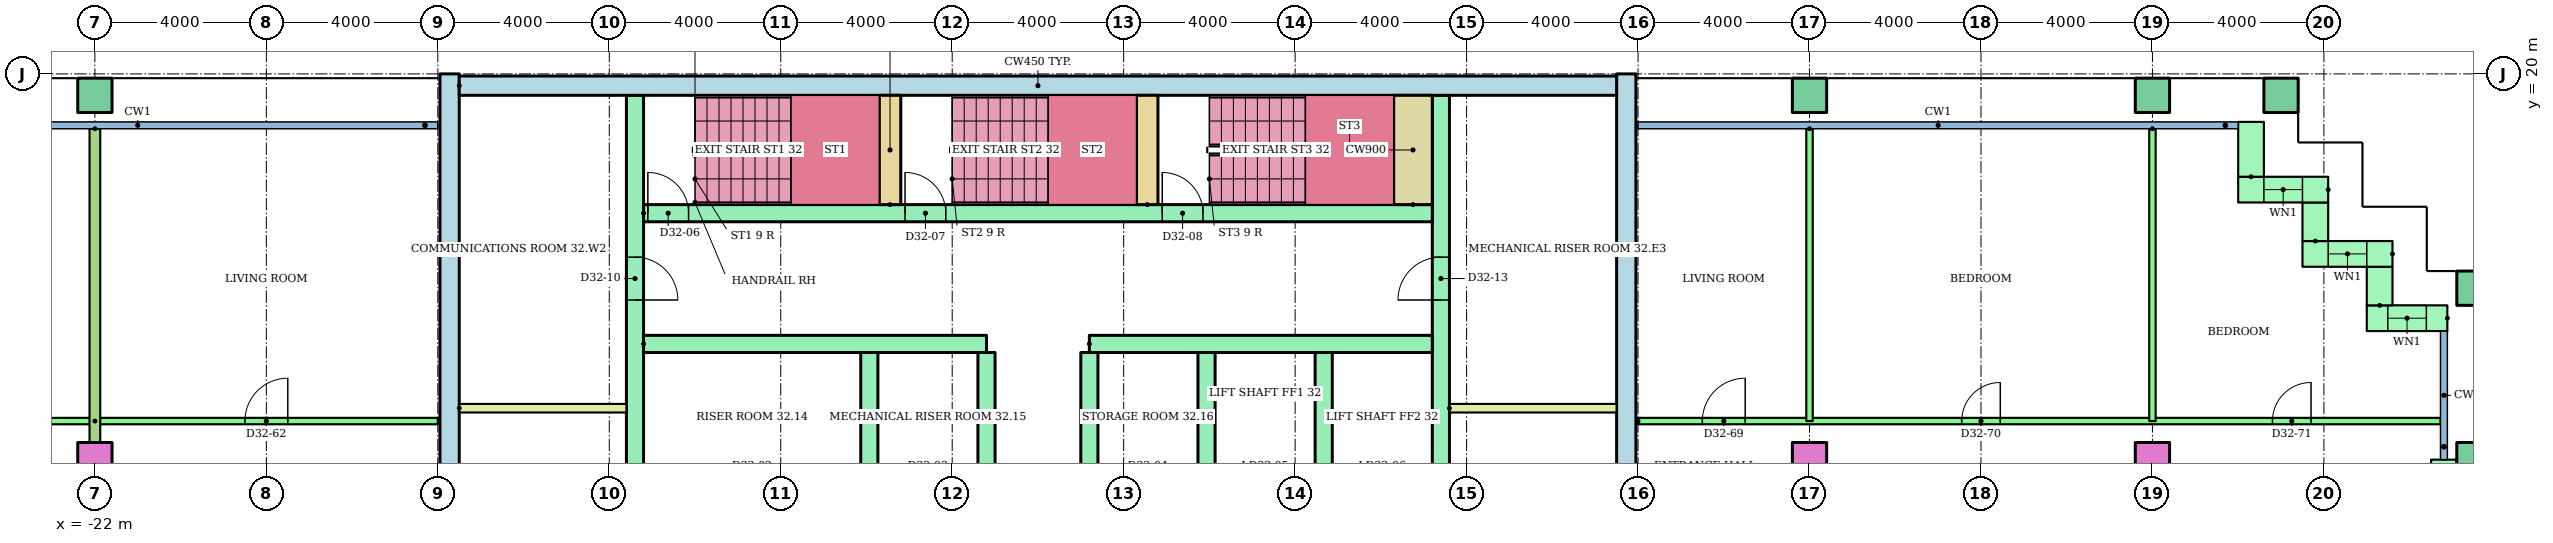
"""IFC4 building model, lengths in metres.
Left out: names, types, materials, properties, quantities, classifications, styles, units other than length and angle.
Written with IfcOpenShell. Run it as: python <this file> out.ifc"""

import sys

from ifc_helpers import new_model, si_unit, direction, frame, frame_2d, origin, origin_2d, place, context, subcontext, project, spatial, rectangle, hollow_rectangle, extrude, element, fill, save


model = new_model("IFC4")
c1 = context("Model", 3, precision=1e-05, world=origin(), true_north=direction((0.0, 1.0)))
c2 = subcontext(c1, "Body", "Model", "MODEL_VIEW")
j1 = project(units=[si_unit("LENGTHUNIT", "METRE"), si_unit("PLANEANGLEUNIT", "RADIAN")], contexts=[c1])
p1 = place(None, origin())
s1 = spatial("IfcSite", under=j1, at=p1, CompositionType="ELEMENT")
p2 = place(p1, origin())
s2 = spatial("IfcBuilding", under=s1, at=p2, CompositionType="ELEMENT")
p3 = place(p2, frame((0.0, 0.0, 126.2)))
s3 = spatial("IfcBuildingStorey", under=s2, at=p3, CompositionType="ELEMENT", Elevation=126.2)
for number, where in (
    (1, (-22.0, 11.0, 0.0)),
    (2, (18.0, 11.0, 0.0)),
    (3, (26.0, 11.0, 0.0)),
):
    element("IfcColumn", number, at=place(p3, frame(where)), inside=s3, PredefinedType="COLUMN", context=c2, shape_type="SweptSolid", body=[
        extrude(rectangle(XDim=0.8, YDim=0.8, at=origin_2d()), origin(), (0.0, 0.0, 1.0), 3.2),
    ])
for number, where in (
    (4, (33.5, 11.0, 0.0)),
    (5, (33.5, 15.0, 0.0)),
    (6, (-22.0, 19.5, 0.0)),
    (7, (18.0, 19.5, 0.0)),
    (8, (26.0, 19.5, 0.0)),
    (9, (29.0, 19.5, 0.0)),
):
    element("IfcColumn", number, at=place(p3, frame(where)), inside=s3, PredefinedType="COLUMN", context=c2, shape_type="SweptSolid", body=[
        extrude(hollow_rectangle(XDim=0.8, YDim=0.8, WallThickness=0.04, at=origin_2d()), origin(), (0.0, 0.0, 1.0), 3.2),
    ])
p4 = place(p3, frame((32.88, 14.3, 0.0), z_axis=(0.0, 0.0, 1.0), x_axis=(-1.0, 0.0, 0.0)))
e10 = element("IfcWall", 10, at=p4, inside=s3, PredefinedType="STANDARD", context=c2, shape_type="SweptSolid", body=[
    extrude(rectangle(XDim=1.88, YDim=0.6, at=frame_2d((0.94, 0.0))), origin(), (0.0, 0.0, 1.0), 2.92),
])
p5 = place(p4, frame((0.49, 0.0, 0.9)))
e11 = element("IfcOpeningElement", 11, at=p5, cuts=e10, PredefinedType="OPENING", context=c2, shape_type="SweptSolid", body=[
    extrude(rectangle(XDim=0.9, YDim=1.5, at=frame_2d((0.45, 0.75))), frame((0.0, 0.31, 0.0), z_axis=(0.0, -1.0, 0.0), x_axis=(1.0, 0.0, 0.0)), (0.0, 0.0, 1.0), 0.62),
])
p6 = place(p3, frame((31.3, 14.6, 0.0), z_axis=(0.0, 0.0, 1.0), x_axis=(0.0, 1.0, 0.0)))
e12 = element("IfcWall", 12, at=p6, inside=s3, PredefinedType="STANDARD", context=c2, shape_type="SweptSolid", body=[
    extrude(rectangle(XDim=0.9, YDim=0.6, at=frame_2d((0.45, 0.0))), origin(), (0.0, 0.0, 1.0), 2.92),
])
p7 = place(p3, frame((31.6, 15.8, 0.0), z_axis=(0.0, 0.0, 1.0), x_axis=(-1.0, 0.0, 0.0)))
e13 = element("IfcWall", 13, at=p7, inside=s3, PredefinedType="STANDARD", context=c2, shape_type="SweptSolid", body=[
    extrude(rectangle(XDim=2.1, YDim=0.6, at=frame_2d((1.05, 0.0))), origin(), (0.0, 0.0, 1.0), 2.92),
])
p8 = place(p7, frame((0.6, 0.0, 0.9)))
e14 = element("IfcOpeningElement", 14, at=p8, cuts=e13, PredefinedType="OPENING", context=c2, shape_type="SweptSolid", body=[
    extrude(rectangle(XDim=0.9, YDim=1.5, at=frame_2d((0.45, 0.75))), frame((0.0, 0.31, 0.0), z_axis=(0.0, -1.0, 0.0), x_axis=(1.0, 0.0, 0.0)), (0.0, 0.0, 1.0), 0.62),
])
p9 = place(p3, frame((29.8, 16.1, 0.0), z_axis=(0.0, 0.0, 1.0), x_axis=(0.0, 1.0, 0.0)))
e15 = element("IfcWall", 15, at=p9, inside=s3, PredefinedType="STANDARD", context=c2, shape_type="SweptSolid", body=[
    extrude(rectangle(XDim=0.9, YDim=0.6, at=frame_2d((0.45, 0.0))), origin(), (0.0, 0.0, 1.0), 2.92),
])
p10 = place(p3, frame((30.1, 17.3, 0.0), z_axis=(0.0, 0.0, 1.0), x_axis=(-1.0, 0.0, 0.0)))
e16 = element("IfcWall", 16, at=p10, inside=s3, PredefinedType="STANDARD", context=c2, shape_type="SweptSolid", body=[
    extrude(rectangle(XDim=2.1, YDim=0.6, at=frame_2d((1.05, 0.0))), origin(), (0.0, 0.0, 1.0), 2.92),
])
p11 = place(p10, frame((0.6, 0.0, 0.9)))
e17 = element("IfcOpeningElement", 17, at=p11, cuts=e16, PredefinedType="OPENING", context=c2, shape_type="SweptSolid", body=[
    extrude(rectangle(XDim=0.9, YDim=1.5, at=frame_2d((0.45, 0.75))), frame((0.0, 0.31, 0.0), z_axis=(0.0, -1.0, 0.0), x_axis=(1.0, 0.0, 0.0)), (0.0, 0.0, 1.0), 0.62),
])
p12 = place(p3, frame((28.3, 17.6, 0.0), z_axis=(0.0, 0.0, 1.0), x_axis=(0.0, 1.0, 0.0)))
e18 = element("IfcWall", 18, at=p12, inside=s3, PredefinedType="STANDARD", context=c2, shape_type="SweptSolid", body=[
    extrude(rectangle(XDim=1.28, YDim=0.6, at=frame_2d((0.64, 0.0))), origin(), (0.0, 0.0, 1.0), 2.92),
])
p13 = place(p3, frame((32.8, 6.5, 0.0), z_axis=(0.0, 0.0, 1.0), x_axis=(0.0, 1.0, 0.0)))
e19 = element("IfcWall", 19, at=p13, inside=s3, PredefinedType="STANDARD", context=c2, shape_type="SweptSolid", body=[
    extrude(rectangle(XDim=4.5, YDim=0.6, at=frame_2d((2.25, 0.0))), origin(), (0.0, 0.0, 1.0), 2.92),
])
p14 = place(p13, frame((1.65, 0.0, 0.0)))
e20 = element("IfcOpeningElement", 20, at=p14, cuts=e19, PredefinedType="OPENING", context=c2, shape_type="SweptSolid", body=[
    extrude(rectangle(XDim=1.2, YDim=2.1, at=frame_2d((0.6, 1.05))), frame((0.0, 0.31, 0.0), z_axis=(0.0, -1.0, 0.0), x_axis=(1.0, 0.0, 0.0)), (0.0, 0.0, 1.0), 0.62),
])
for number, where, z_axis, x_axis in (
    (21, (-13.725, 3.0, 0.0), (0.0, 0.0, 1.0), (0.0, 1.0, 0.0)),
    (22, (13.725, 3.0, 0.0), (0.0, 0.0, 1.0), (0.0, 1.0, 0.0)),
):
    element("IfcWall", number, at=place(p3, frame(where, z_axis=z_axis, x_axis=x_axis)), inside=s3, PredefinedType="SHEAR", context=c2, shape_type="SweptSolid", body=[
        extrude(rectangle(XDim=17.0, YDim=0.45, at=frame_2d((8.5, 0.0))), origin(), (0.0, 0.0, 1.0), 2.92),
    ])
p15 = place(p3, frame((-13.5, 19.725, 0.0)))
e23 = element("IfcWall", 23, at=p15, inside=s3, PredefinedType="SHEAR", context=c2, shape_type="SweptSolid", body=[
    extrude(rectangle(XDim=27.0, YDim=0.45, at=frame_2d((13.5, 0.0))), origin(), (0.0, 0.0, 1.0), 2.92),
])
p16 = place(p3, frame((-9.4, 6.8, 0.0), z_axis=(0.0, 0.0, 1.0), x_axis=(0.0, 1.0, 0.0)))
e24 = element("IfcWall", 24, at=p16, inside=s3, PredefinedType="SHEAR", context=c2, shape_type="SweptSolid", body=[
    extrude(rectangle(XDim=12.7, YDim=0.4, at=frame_2d((6.35, 0.0))), origin(), (0.0, 0.0, 1.0), 2.92),
])
p17 = place(p16, frame((1.15, 0.0, 0.0)))
e25 = element("IfcOpeningElement", 25, at=p17, cuts=e24, PredefinedType="OPENING", context=c2, shape_type="SweptSolid", body=[
    extrude(rectangle(XDim=1.0, YDim=2.1, at=frame_2d((0.5, 1.05))), frame((0.0, 0.21, 0.0), z_axis=(0.0, -1.0, 0.0), x_axis=(1.0, 0.0, 0.0)), (0.0, 0.0, 1.0), 0.42),
])
p18 = place(p16, frame((7.925, 0.0, 0.0)))
e26 = element("IfcOpeningElement", 26, at=p18, cuts=e24, PredefinedType="OPENING", context=c2, shape_type="SweptSolid", body=[
    extrude(rectangle(XDim=1.0, YDim=2.1, at=frame_2d((0.5, 1.05))), frame((0.0, 0.21, 0.0), z_axis=(0.0, -1.0, 0.0), x_axis=(1.0, 0.0, 0.0)), (0.0, 0.0, 1.0), 0.42),
])
p19 = place(p3, frame((9.4, 6.8, 0.0), z_axis=(0.0, 0.0, 1.0), x_axis=(0.0, 1.0, 0.0)))
e27 = element("IfcWall", 27, at=p19, inside=s3, PredefinedType="SHEAR", context=c2, shape_type="SweptSolid", body=[
    extrude(rectangle(XDim=12.7, YDim=0.4, at=frame_2d((6.35, 0.0))), origin(), (0.0, 0.0, 1.0), 2.92),
])
p20 = place(p19, frame((0.3, 0.0, 0.0)))
e28 = element("IfcOpeningElement", 28, at=p20, cuts=e27, PredefinedType="OPENING", context=c2, shape_type="SweptSolid", body=[
    extrude(rectangle(XDim=1.0, YDim=2.1, at=frame_2d((0.5, 1.05))), frame((0.0, 0.21, 0.0), z_axis=(0.0, -1.0, 0.0), x_axis=(1.0, 0.0, 0.0)), (0.0, 0.0, 1.0), 0.42),
])
p21 = place(p19, frame((2.05, 0.0, 0.0)))
e29 = element("IfcOpeningElement", 29, at=p21, cuts=e27, PredefinedType="OPENING", context=c2, shape_type="SweptSolid", body=[
    extrude(rectangle(XDim=1.0, YDim=2.1, at=frame_2d((0.5, 1.05))), frame((0.0, 0.21, 0.0), z_axis=(0.0, -1.0, 0.0), x_axis=(1.0, 0.0, 0.0)), (0.0, 0.0, 1.0), 0.42),
])
p22 = place(p19, frame((7.925, 0.0, 0.0)))
e30 = element("IfcOpeningElement", 30, at=p22, cuts=e27, PredefinedType="OPENING", context=c2, shape_type="SweptSolid", body=[
    extrude(rectangle(XDim=1.0, YDim=2.1, at=frame_2d((0.5, 1.05))), frame((0.0, 0.21, 0.0), z_axis=(0.0, -1.0, 0.0), x_axis=(1.0, 0.0, 0.0)), (0.0, 0.0, 1.0), 0.42),
])
for number, where in (
    (31, (-9.2, 13.7, 0.0)),
    (32, (1.2, 13.7, 0.0)),
):
    element("IfcWall", number, at=place(p3, frame(where)), inside=s3, PredefinedType="SHEAR", context=c2, shape_type="SweptSolid", body=[
        extrude(rectangle(XDim=8.0, YDim=0.4, at=frame_2d((4.0, 0.0))), origin(), (0.0, 0.0, 1.0), 2.92),
    ])
for number, where, z_axis, x_axis in (
    (33, (-3.933, 10.5, 0.0), (0.0, 0.0, 1.0), (0.0, 1.0, 0.0)),
    (34, (-1.2, 10.5, 0.0), (0.0, 0.0, 1.0), (0.0, 1.0, 0.0)),
    (35, (1.2, 10.5, 0.0), (0.0, 0.0, 1.0), (0.0, 1.0, 0.0)),
    (36, (3.933, 10.5, 0.0), (0.0, 0.0, 1.0), (0.0, 1.0, 0.0)),
    (37, (6.667, 10.5, 0.0), (0.0, 0.0, 1.0), (0.0, 1.0, 0.0)),
):
    element("IfcWall", number, at=place(p3, frame(where, z_axis=z_axis, x_axis=x_axis)), inside=s3, PredefinedType="SHEAR", context=c2, shape_type="SweptSolid", body=[
        extrude(rectangle(XDim=3.0, YDim=0.4, at=frame_2d((1.5, 0.0))), origin(), (0.0, 0.0, 1.0), 2.92),
    ])
p23 = place(p3, frame((-9.2, 16.75, 0.0)))
e38 = element("IfcWall", 38, at=p23, inside=s3, PredefinedType="SHEAR", context=c2, shape_type="SweptSolid", body=[
    extrude(rectangle(XDim=18.4, YDim=0.4, at=frame_2d((9.2, 0.0))), origin(), (0.0, 0.0, 1.0), 2.92),
])
p24 = place(p23, frame((0.1, 0.0, 0.0)))
e39 = element("IfcOpeningElement", 39, at=p24, cuts=e38, PredefinedType="OPENING", context=c2, shape_type="SweptSolid", body=[
    extrude(rectangle(XDim=0.95, YDim=2.1, at=frame_2d((0.475, 1.05))), frame((0.0, 0.21, 0.0), z_axis=(0.0, -1.0, 0.0), x_axis=(1.0, 0.0, 0.0)), (0.0, 0.0, 1.0), 0.42),
])
p25 = place(p23, frame((6.1, 0.0, 0.0)))
e40 = element("IfcOpeningElement", 40, at=p25, cuts=e38, PredefinedType="OPENING", context=c2, shape_type="SweptSolid", body=[
    extrude(rectangle(XDim=0.95, YDim=2.1, at=frame_2d((0.475, 1.05))), frame((0.0, 0.21, 0.0), z_axis=(0.0, -1.0, 0.0), x_axis=(1.0, 0.0, 0.0)), (0.0, 0.0, 1.0), 0.42),
])
p26 = place(p23, frame((12.1, 0.0, 0.0)))
e41 = element("IfcOpeningElement", 41, at=p26, cuts=e38, PredefinedType="OPENING", context=c2, shape_type="SweptSolid", body=[
    extrude(rectangle(XDim=0.95, YDim=2.1, at=frame_2d((0.475, 1.05))), frame((0.0, 0.21, 0.0), z_axis=(0.0, -1.0, 0.0), x_axis=(1.0, 0.0, 0.0)), (0.0, 0.0, 1.0), 0.42),
])
for number, where, z_axis, x_axis in (
    (42, (-3.45, 16.95, 0.0), (0.0, 0.0, 1.0), (0.0, 1.0, 0.0)),
    (43, (2.55, 16.95, 0.0), (0.0, 0.0, 1.0), (0.0, 1.0, 0.0)),
):
    element("IfcWall", number, at=place(p3, frame(where, z_axis=z_axis, x_axis=x_axis)), inside=s3, PredefinedType="SHEAR", context=c2, shape_type="SweptSolid", body=[
        extrude(rectangle(XDim=2.55, YDim=0.5, at=frame_2d((1.275, 0.0))), origin(), (0.0, 0.0, 1.0), 2.92),
    ])
p27 = place(p3, frame((8.75, 16.95, 0.0), z_axis=(0.0, 0.0, 1.0), x_axis=(0.0, 1.0, 0.0)))
e44 = element("IfcWall", 44, at=p27, inside=s3, PredefinedType="SHEAR", context=c2, shape_type="SweptSolid", body=[
    extrude(rectangle(XDim=2.55, YDim=0.9, at=frame_2d((1.275, 0.0))), origin(), (0.0, 0.0, 1.0), 2.92),
])
for number, where in (
    (45, (-13.5, 12.2, 0.0)),
    (46, (9.6, 12.2, 0.0)),
):
    element("IfcWall", number, at=place(p3, frame(where)), inside=s3, PredefinedType="PARTITIONING", context=c2, shape_type="SweptSolid", body=[
        extrude(rectangle(XDim=3.9, YDim=0.2, at=frame_2d((1.95, 0.0))), origin(), (0.0, 0.0, 1.0), 2.92),
    ])
p28 = place(p3, frame((-32.72, 11.9, 0.0)))
e47 = element("IfcWall", 47, at=p28, inside=s3, PredefinedType="PARTITIONING", context=c2, shape_type="SweptSolid", body=[
    extrude(rectangle(XDim=10.72, YDim=0.15, at=frame_2d((5.36, 0.0))), origin(), (0.0, 0.0, 1.0), 2.4),
])
p29 = place(p28, frame((1.102, 0.0, 0.0)))
e48 = element("IfcOpeningElement", 48, at=p29, cuts=e47, PredefinedType="OPENING", context=c2, shape_type="SweptSolid", body=[
    extrude(rectangle(XDim=1.0, YDim=2.1, at=frame_2d((0.5, 1.05))), frame((0.0, 0.085, 0.0), z_axis=(0.0, -1.0, 0.0), x_axis=(1.0, 0.0, 0.0)), (0.0, 0.0, 1.0), 0.17),
])
p30 = place(p28, frame((7.22, 0.0, 0.0)))
e49 = element("IfcOpeningElement", 49, at=p30, cuts=e47, PredefinedType="OPENING", context=c2, shape_type="SweptSolid", body=[
    extrude(rectangle(XDim=1.0, YDim=2.1, at=frame_2d((0.5, 1.05))), frame((0.0, 0.085, 0.0), z_axis=(0.0, -1.0, 0.0), x_axis=(1.0, 0.0, 0.0)), (0.0, 0.0, 1.0), 0.17),
])
p31 = place(p3, frame((-22.0, 11.9, 0.0)))
e50 = element("IfcWall", 50, at=p31, inside=s3, PredefinedType="PARTITIONING", context=c2, shape_type="SweptSolid", body=[
    extrude(rectangle(XDim=8.0, YDim=0.15, at=frame_2d((4.0, 0.0))), origin(), (0.0, 0.0, 1.0), 2.4),
])
p32 = place(p31, frame((3.5, 0.0, 0.0)))
e51 = element("IfcOpeningElement", 51, at=p32, cuts=e50, PredefinedType="OPENING", context=c2, shape_type="SweptSolid", body=[
    extrude(rectangle(XDim=1.0, YDim=2.1, at=frame_2d((0.5, 1.05))), frame((0.0, 0.085, 0.0), z_axis=(0.0, -1.0, 0.0), x_axis=(1.0, 0.0, 0.0)), (0.0, 0.0, 1.0), 0.17),
])
p33 = place(p3, frame((-22.0, 18.721, 0.0), z_axis=(0.0, 0.0, 1.0), x_axis=(0.0, -1.0, 0.0)))
e52 = element("IfcWall", 52, at=p33, inside=s3, PredefinedType="PARTITIONING", context=c2, shape_type="SweptSolid", body=[
    extrude(rectangle(XDim=17.321, YDim=0.25, at=frame_2d((8.661, 0.0))), origin(), (0.0, 0.0, 1.0), 2.4),
])
p34 = place(p3, frame((14.0, 11.9, 0.0)))
e53 = element("IfcWall", 53, at=p34, inside=s3, PredefinedType="PARTITIONING", context=c2, shape_type="SweptSolid", body=[
    extrude(rectangle(XDim=18.72, YDim=0.15, at=frame_2d((9.36, 0.0))), origin(), (0.0, 0.0, 1.0), 2.4),
])
p35 = place(p34, frame((1.5, 0.0, 0.0)))
e54 = element("IfcOpeningElement", 54, at=p35, cuts=e53, PredefinedType="OPENING", context=c2, shape_type="SweptSolid", body=[
    extrude(rectangle(XDim=1.0, YDim=2.1, at=frame_2d((0.5, 1.05))), frame((0.0, 0.085, 0.0), z_axis=(0.0, -1.0, 0.0), x_axis=(1.0, 0.0, 0.0)), (0.0, 0.0, 1.0), 0.17),
])
p36 = place(p34, frame((7.55, 0.0, 0.0)))
e55 = element("IfcOpeningElement", 55, at=p36, cuts=e53, PredefinedType="OPENING", context=c2, shape_type="SweptSolid", body=[
    extrude(rectangle(XDim=0.9, YDim=2.1, at=frame_2d((0.45, 1.05))), frame((0.0, 0.085, 0.0), z_axis=(0.0, -1.0, 0.0), x_axis=(1.0, 0.0, 0.0)), (0.0, 0.0, 1.0), 0.17),
])
p37 = place(p34, frame((14.8, 0.0, 0.0)))
e56 = element("IfcOpeningElement", 56, at=p37, cuts=e53, PredefinedType="OPENING", context=c2, shape_type="SweptSolid", body=[
    extrude(rectangle(XDim=0.9, YDim=2.1, at=frame_2d((0.45, 1.05))), frame((0.0, 0.085, 0.0), z_axis=(0.0, -1.0, 0.0), x_axis=(1.0, 0.0, 0.0)), (0.0, 0.0, 1.0), 0.17),
])
for number, where, z_axis, x_axis in (
    (57, (18.0, 18.721, 0.0), (0.0, 0.0, 1.0), (0.0, -1.0, 0.0)),
    (58, (26.0, 18.721, 0.0), (0.0, 0.0, 1.0), (0.0, -1.0, 0.0)),
):
    element("IfcWall", number, at=place(p3, frame(where, z_axis=z_axis, x_axis=x_axis)), inside=s3, PredefinedType="PARTITIONING", context=c2, shape_type="SweptSolid", body=[
        extrude(rectangle(XDim=6.821, YDim=0.15, at=frame_2d((3.411, 0.0))), origin(), (0.0, 0.0, 1.0), 2.4),
    ])
p38 = place(p5, origin())
e59 = element("IfcWindow", 59, at=p38, inside=s3, PartitioningType="SINGLE_PANEL", PredefinedType="WINDOW", context=c2, shape_type="SweptSolid", body=[
    extrude(rectangle(XDim=0.9, YDim=1.5, at=frame_2d((0.45, 0.75))), frame((0.0, 0.03, 0.0), z_axis=(0.0, -1.0, 0.0), x_axis=(1.0, 0.0, 0.0)), (0.0, 0.0, 1.0), 0.06),
])
fill(e11, e59)
p39 = place(p8, origin())
e60 = element("IfcWindow", 60, at=p39, inside=s3, PartitioningType="SINGLE_PANEL", PredefinedType="WINDOW", context=c2, shape_type="SweptSolid", body=[
    extrude(rectangle(XDim=0.9, YDim=1.5, at=frame_2d((0.45, 0.75))), frame((0.0, 0.03, 0.0), z_axis=(0.0, -1.0, 0.0), x_axis=(1.0, 0.0, 0.0)), (0.0, 0.0, 1.0), 0.06),
])
fill(e14, e60)
p40 = place(p11, origin())
e61 = element("IfcWindow", 61, at=p40, inside=s3, PartitioningType="SINGLE_PANEL", PredefinedType="WINDOW", context=c2, shape_type="SweptSolid", body=[
    extrude(rectangle(XDim=0.9, YDim=1.5, at=frame_2d((0.45, 0.75))), frame((0.0, 0.03, 0.0), z_axis=(0.0, -1.0, 0.0), x_axis=(1.0, 0.0, 0.0)), (0.0, 0.0, 1.0), 0.06),
])
fill(e17, e61)
p41 = place(p24, origin())
e62 = element("IfcDoor", 62, at=p41, inside=s3, OperationType="SINGLE_SWING_LEFT", PredefinedType="DOOR", context=c2, shape_type="SweptSolid", body=[
    extrude(rectangle(XDim=0.95, YDim=2.1, at=frame_2d((0.475, 1.05))), frame((0.0, 0.025, 0.0), z_axis=(0.0, -1.0, 0.0), x_axis=(1.0, 0.0, 0.0)), (0.0, 0.0, 1.0), 0.05),
])
fill(e39, e62)
p42 = place(p25, origin())
e63 = element("IfcDoor", 63, at=p42, inside=s3, OperationType="SINGLE_SWING_LEFT", PredefinedType="DOOR", context=c2, shape_type="SweptSolid", body=[
    extrude(rectangle(XDim=0.95, YDim=2.1, at=frame_2d((0.475, 1.05))), frame((0.0, 0.025, 0.0), z_axis=(0.0, -1.0, 0.0), x_axis=(1.0, 0.0, 0.0)), (0.0, 0.0, 1.0), 0.05),
])
fill(e40, e63)
p43 = place(p26, origin())
e64 = element("IfcDoor", 64, at=p43, inside=s3, OperationType="SINGLE_SWING_LEFT", PredefinedType="DOOR", context=c2, shape_type="SweptSolid", body=[
    extrude(rectangle(XDim=0.95, YDim=2.1, at=frame_2d((0.475, 1.05))), frame((0.0, 0.025, 0.0), z_axis=(0.0, -1.0, 0.0), x_axis=(1.0, 0.0, 0.0)), (0.0, 0.0, 1.0), 0.05),
])
fill(e41, e64)
p44 = place(p18, frame((1.0, 0.0, 0.0), z_axis=(0.0, 0.0, 1.0), x_axis=(-1.0, 0.0, 0.0)))
e65 = element("IfcDoor", 65, at=p44, inside=s3, OperationType="SINGLE_SWING_LEFT", PredefinedType="DOOR", context=c2, shape_type="SweptSolid", body=[
    extrude(rectangle(XDim=1.0, YDim=2.1, at=frame_2d((0.5, 1.05))), frame((0.0, 0.025, 0.0), z_axis=(0.0, -1.0, 0.0), x_axis=(1.0, 0.0, 0.0)), (0.0, 0.0, 1.0), 0.05),
])
fill(e26, e65)
p45 = place(p22, origin())
e66 = element("IfcDoor", 66, at=p45, inside=s3, OperationType="SINGLE_SWING_LEFT", PredefinedType="DOOR", context=c2, shape_type="SweptSolid", body=[
    extrude(rectangle(XDim=1.0, YDim=2.1, at=frame_2d((0.5, 1.05))), frame((0.0, 0.025, 0.0), z_axis=(0.0, -1.0, 0.0), x_axis=(1.0, 0.0, 0.0)), (0.0, 0.0, 1.0), 0.05),
])
fill(e30, e66)
p46 = place(p32, origin())
e67 = element("IfcDoor", 67, at=p46, inside=s3, OperationType="SINGLE_SWING_RIGHT", PredefinedType="DOOR", context=c2, shape_type="SweptSolid", body=[
    extrude(rectangle(XDim=1.0, YDim=2.1, at=frame_2d((0.5, 1.05))), frame((0.0, 0.025, 0.0), z_axis=(0.0, -1.0, 0.0), x_axis=(1.0, 0.0, 0.0)), (0.0, 0.0, 1.0), 0.05),
])
fill(e51, e67)
p47 = place(p35, origin())
e68 = element("IfcDoor", 68, at=p47, inside=s3, OperationType="SINGLE_SWING_RIGHT", PredefinedType="DOOR", context=c2, shape_type="SweptSolid", body=[
    extrude(rectangle(XDim=1.0, YDim=2.1, at=frame_2d((0.5, 1.05))), frame((0.0, 0.025, 0.0), z_axis=(0.0, -1.0, 0.0), x_axis=(1.0, 0.0, 0.0)), (0.0, 0.0, 1.0), 0.05),
])
fill(e54, e68)
p48 = place(p36, origin())
e69 = element("IfcDoor", 69, at=p48, inside=s3, OperationType="SINGLE_SWING_RIGHT", PredefinedType="DOOR", context=c2, shape_type="SweptSolid", body=[
    extrude(rectangle(XDim=0.9, YDim=2.1, at=frame_2d((0.45, 1.05))), frame((0.0, 0.025, 0.0), z_axis=(0.0, -1.0, 0.0), x_axis=(1.0, 0.0, 0.0)), (0.0, 0.0, 1.0), 0.05),
])
fill(e55, e69)
p49 = place(p37, origin())
e70 = element("IfcDoor", 70, at=p49, inside=s3, OperationType="SINGLE_SWING_RIGHT", PredefinedType="DOOR", context=c2, shape_type="SweptSolid", body=[
    extrude(rectangle(XDim=0.9, YDim=2.1, at=frame_2d((0.45, 1.05))), frame((0.0, 0.025, 0.0), z_axis=(0.0, -1.0, 0.0), x_axis=(1.0, 0.0, 0.0)), (0.0, 0.0, 1.0), 0.05),
])
fill(e56, e70)
save(model, sys.argv[1])
